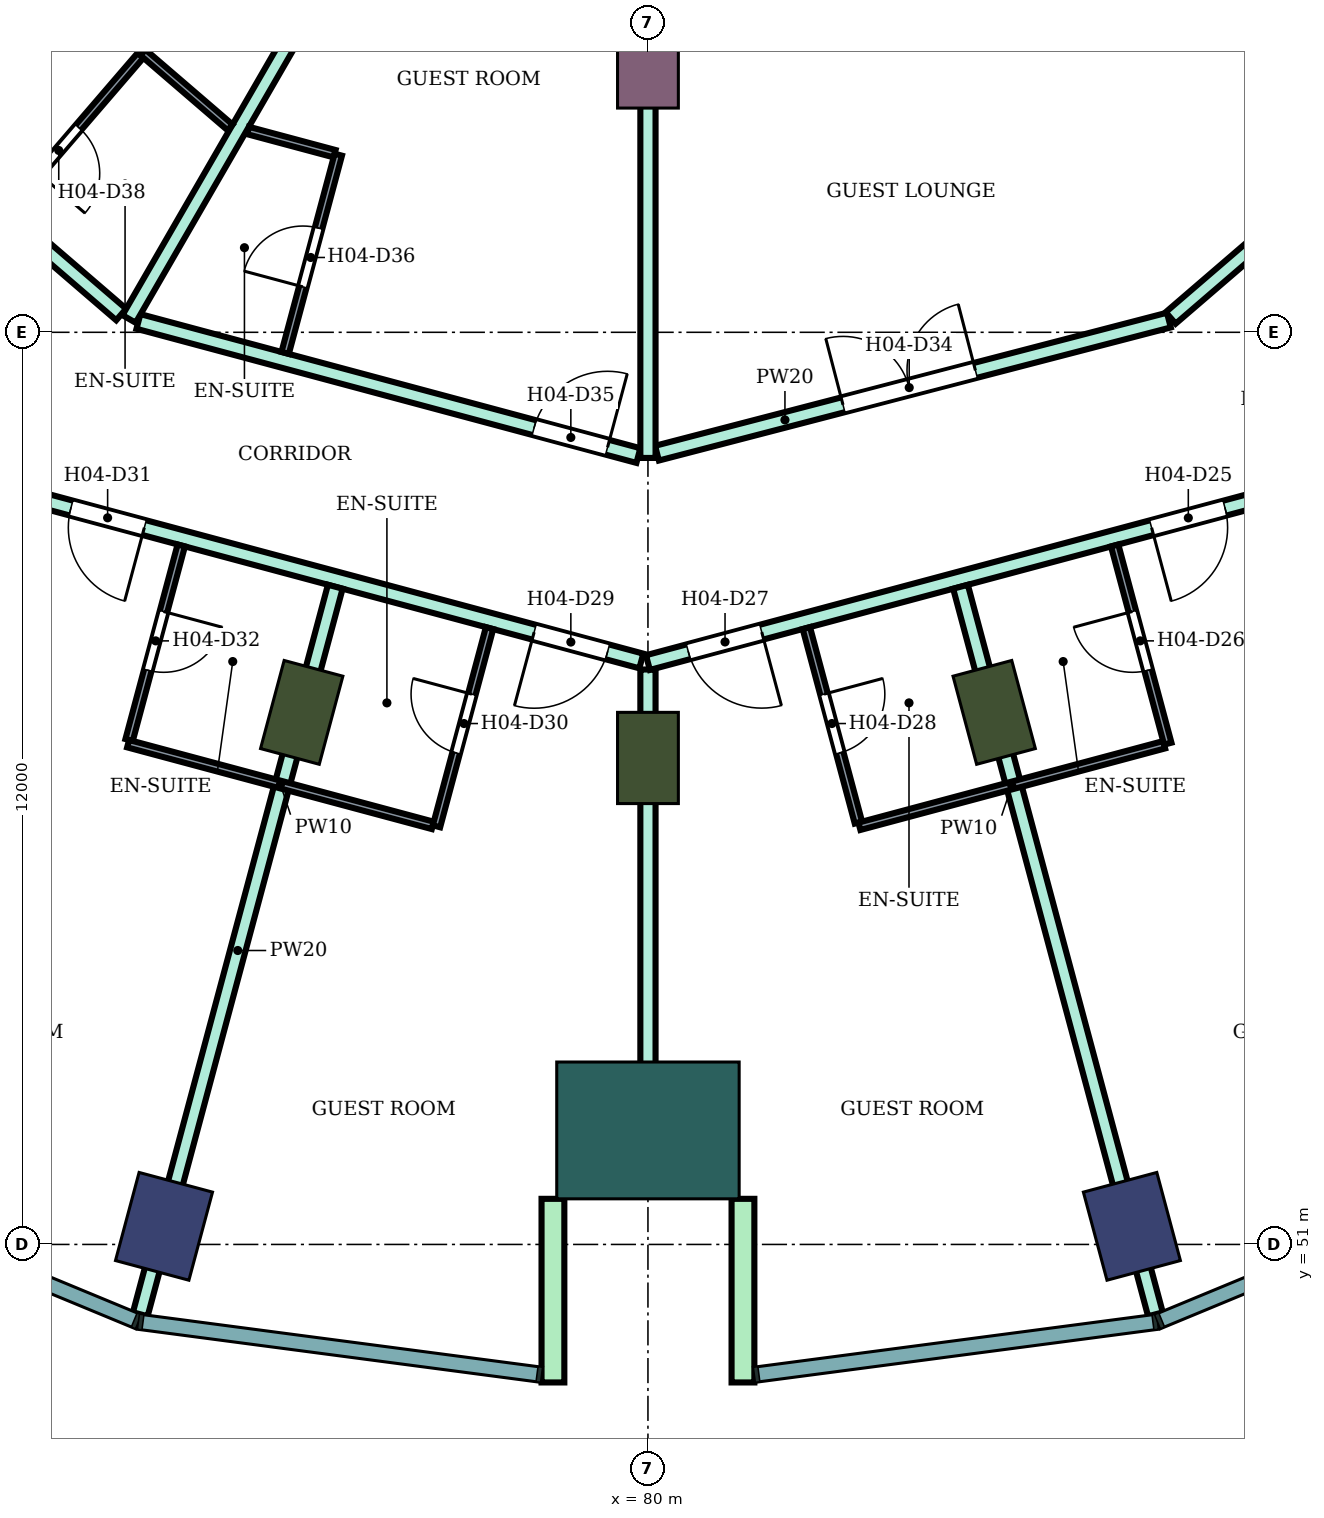
"""IFC4 building model, lengths in metres.
Left out: names, types, materials, properties, quantities, classifications, styles, units other than length and angle.
Written with IfcOpenShell. Run it as: python <this file> out.ifc"""

import sys

from ifc_helpers import new_model, si_unit, direction, frame, frame_2d, origin, origin_2d, place, context, subcontext, project, spatial, rectangle, extrude, element, fill, save


model = new_model("IFC4")
c1 = context("Model", 3, precision=1e-05, world=origin(), true_north=direction((0.0, 1.0)))
c2 = subcontext(c1, "Body", "Model", "MODEL_VIEW")
j1 = project(units=[si_unit("LENGTHUNIT", "METRE"), si_unit("PLANEANGLEUNIT", "RADIAN")], contexts=[c1])
p1 = place(None, origin())
s1 = spatial("IfcSite", under=j1, at=p1, CompositionType="ELEMENT")
p2 = place(p1, origin())
s2 = spatial("IfcBuilding", under=s1, at=p2, CompositionType="ELEMENT")
p3 = place(p2, frame((0.0, 0.0, 70.6)))
s3 = spatial("IfcBuildingStorey", under=s2, at=p3, CompositionType="ELEMENT", Elevation=70.6)
for number, where, z_axis, x_axis in (
    (1, (73.633, 51.238, 0.0), (0.0, 0.0, 1.0), (-0.259, -0.966, 0.0)),
    (2, (86.367, 51.238, 0.0), (0.0, 0.0, 1.0), (0.259, -0.966, 0.0)),
):
    element("IfcColumn", number, at=place(p3, frame(where, z_axis=z_axis, x_axis=x_axis)), inside=s3, PredefinedType="COLUMN", context=c2, shape_type="SweptSolid", body=[
        extrude(rectangle(XDim=1.2, YDim=1.0, at=origin_2d()), origin(), (0.0, 0.0, 1.0), 3.8),
    ])
for number, where, z_axis, x_axis in (
    (3, (75.445, 58.0, 0.0), (0.0, 0.0, 1.0), (-0.259, -0.966, 0.0)),
    (4, (80.0, 57.4, 0.0), (0.0, 0.0, 1.0), (0.0, -1.0, 0.0)),
    (5, (84.555, 58.0, 0.0), (0.0, 0.0, 1.0), (0.259, -0.966, 0.0)),
):
    element("IfcColumn", number, at=place(p3, frame(where, z_axis=z_axis, x_axis=x_axis)), inside=s3, PredefinedType="COLUMN", context=c2, shape_type="SweptSolid", body=[
        extrude(rectangle(XDim=1.2, YDim=0.8, at=origin_2d()), origin(), (0.0, 0.0, 1.0), 3.8),
    ])
p4 = place(p3, frame((80.0, 66.4, 0.0), z_axis=(0.0, 0.0, 1.0), x_axis=(0.0, -1.0, 0.0)))
e6 = element("IfcColumn", 6, at=p4, inside=s3, PredefinedType="COLUMN", context=c2, shape_type="SweptSolid", body=[
    extrude(rectangle(XDim=0.9, YDim=0.8, at=origin_2d()), origin(), (0.0, 0.0, 1.0), 3.8),
])
p5 = place(p3, frame((80.0, 52.5, 0.0), z_axis=(0.0, 0.0, 1.0), x_axis=(0.0, -1.0, 0.0)))
e7 = element("IfcColumn", 7, at=p5, inside=s3, PredefinedType="COLUMN", context=c2, shape_type="SweptSolid", body=[
    extrude(rectangle(XDim=1.8, YDim=2.4, at=origin_2d()), origin(), (0.0, 0.0, 1.0), 3.8),
])
for number, where, z_axis, x_axis in (
    (8, (78.75, 51.6, 0.0), (0.0, 0.0, 1.0), (0.0, -1.0, 0.0)),
    (9, (81.25, 51.6, 0.0), (0.0, 0.0, 1.0), (0.0, -1.0, 0.0)),
):
    element("IfcWall", number, at=place(p3, frame(where, z_axis=z_axis, x_axis=x_axis)), inside=s3, PredefinedType="NOTDEFINED", context=c2, shape_type="SweptSolid", body=[
        extrude(rectangle(XDim=2.416, YDim=0.3, at=frame_2d((1.208, 0.0))), origin(), (0.0, 0.0, 1.0), 3.8),
    ])
p6 = place(p3, frame((69.158, 66.6, 0.0), z_axis=(0.0, 0.0, 1.0), x_axis=(0.757976058094, -0.652282373943, 0.0)))
e10 = element("IfcWall", 10, at=p6, inside=s3, PredefinedType="PARTITIONING", context=c2, shape_type="SweptSolid", body=[
    extrude(rectangle(XDim=5.16, YDim=0.2, at=frame_2d((2.58, 0.0))), origin(), (0.0, 0.0, 1.0), 3.35),
])
p7 = place(p6, frame((1.6, 0.0, 0.0)))
e11 = element("IfcOpeningElement", 11, at=p7, cuts=e10, PredefinedType="OPENING", context=c2, shape_type="SweptSolid", body=[
    extrude(rectangle(XDim=1.0, YDim=2.1, at=frame_2d((0.5, 1.05))), frame((0.0, 0.11, 0.0), z_axis=(0.0, -1.0, 0.0), x_axis=(1.0, 0.0, 0.0)), (0.0, 0.0, 1.0), 0.22),
])
p8 = place(p3, frame((71.877, 60.832, 0.0), z_axis=(0.0, 0.0, 1.0), x_axis=(0.965852509869, -0.259092510851, 0.0)))
e12 = element("IfcWall", 12, at=p8, inside=s3, PredefinedType="PARTITIONING", context=c2, shape_type="SweptSolid", body=[
    extrude(rectangle(XDim=8.32, YDim=0.2, at=frame_2d((4.16, 0.0))), origin(), (0.0, 0.0, 1.0), 3.35),
])
p9 = place(p8, frame((6.86, 0.0, 0.0)))
e13 = element("IfcOpeningElement", 13, at=p9, cuts=e12, PredefinedType="OPENING", context=c2, shape_type="SweptSolid", body=[
    extrude(rectangle(XDim=1.0, YDim=2.1, at=frame_2d((0.5, 1.05))), frame((0.0, 0.11, 0.0), z_axis=(0.0, -1.0, 0.0), x_axis=(1.0, 0.0, 0.0)), (0.0, 0.0, 1.0), 0.22),
])
p10 = place(p8, frame((0.55, 0.0, 0.0)))
e14 = element("IfcOpeningElement", 14, at=p10, cuts=e12, PredefinedType="OPENING", context=c2, shape_type="SweptSolid", body=[
    extrude(rectangle(XDim=1.0, YDim=2.1, at=frame_2d((0.5, 1.05))), frame((0.0, 0.11, 0.0), z_axis=(0.0, -1.0, 0.0), x_axis=(1.0, 0.0, 0.0)), (0.0, 0.0, 1.0), 0.22),
])
p11 = place(p3, frame((73.297, 63.143, 0.0), z_axis=(0.0, 0.0, 1.0), x_axis=(0.965859030528, -0.25906820173, 0.0)))
e15 = element("IfcWall", 15, at=p11, inside=s3, PredefinedType="PARTITIONING", context=c2, shape_type="SweptSolid", body=[
    extrude(rectangle(XDim=6.81, YDim=0.2, at=frame_2d((3.405, 0.0))), origin(), (0.0, 0.0, 1.0), 3.35),
])
p12 = place(p11, frame((5.39, 0.0, 0.0)))
e16 = element("IfcOpeningElement", 16, at=p12, cuts=e15, PredefinedType="OPENING", context=c2, shape_type="SweptSolid", body=[
    extrude(rectangle(XDim=1.0, YDim=2.1, at=frame_2d((0.5, 1.05))), frame((0.0, 0.11, 0.0), z_axis=(0.0, -1.0, 0.0), x_axis=(1.0, 0.0, 0.0)), (0.0, 0.0, 1.0), 0.22),
])
p13 = place(p3, frame((73.174, 63.176, 0.0), z_axis=(0.0, 0.0, 1.0), x_axis=(0.500257106344, 0.865876912472, 0.0)))
e17 = element("IfcWall", 17, at=p13, inside=s3, PredefinedType="PARTITIONING", context=c2, shape_type="SweptSolid", body=[
    extrude(rectangle(XDim=5.955, YDim=0.2, at=frame_2d((2.978, 0.0))), origin(), (0.0, 0.0, 1.0), 3.35),
])
p14 = place(p3, frame((73.321, 50.081, 0.0), z_axis=(0.0, 0.0, 1.0), x_axis=(0.258889198551, 0.965907025999, 0.0)))
e18 = element("IfcWall", 18, at=p14, inside=s3, PredefinedType="PARTITIONING", context=c2, shape_type="SweptSolid", body=[
    extrude(rectangle(XDim=9.909, YDim=0.2, at=frame_2d((4.955, 0.0))), origin(), (0.0, 0.0, 1.0), 3.35),
])
p15 = place(p3, frame((80.119, 61.41, 0.0), z_axis=(0.0, 0.0, 1.0), x_axis=(0.967823361235, 0.251630565408, 0.0)))
e19 = element("IfcWall", 19, at=p15, inside=s3, PredefinedType="PARTITIONING", context=c2, shape_type="SweptSolid", body=[
    extrude(rectangle(XDim=6.958, YDim=0.2, at=frame_2d((3.479, 0.0))), origin(), (0.0, 0.0, 1.0), 3.35),
])
p16 = place(p15, frame((2.529, 0.0, 0.0)))
e20 = element("IfcOpeningElement", 20, at=p16, cuts=e19, PredefinedType="OPENING", context=c2, shape_type="SweptSolid", body=[
    extrude(rectangle(XDim=1.8, YDim=2.1, at=frame_2d((0.9, 1.05))), frame((0.0, 0.11, 0.0), z_axis=(0.0, -1.0, 0.0), x_axis=(1.0, 0.0, 0.0)), (0.0, 0.0, 1.0), 0.22),
])
p17 = place(p3, frame((80.0, 51.8, 0.0), z_axis=(0.0, 0.0, 1.0), x_axis=(0.0, 1.0, 0.0)))
e21 = element("IfcWall", 21, at=p17, inside=s3, PredefinedType="PARTITIONING", context=c2, shape_type="SweptSolid", body=[
    extrude(rectangle(XDim=6.764, YDim=0.2, at=frame_2d((3.382, 0.0))), origin(), (0.0, 0.0, 1.0), 3.35),
])
p18 = place(p3, frame((80.0, 58.655, 0.0), z_axis=(0.0, 0.0, 1.0), x_axis=(0.965974635626, 0.258636817424, 0.0)))
e22 = element("IfcWall", 22, at=p18, inside=s3, PredefinedType="PARTITIONING", context=c2, shape_type="SweptSolid", body=[
    extrude(rectangle(XDim=8.36, YDim=0.2, at=frame_2d((4.18, 0.0))), origin(), (0.0, 0.0, 1.0), 3.35),
])
p19 = place(p18, frame((6.86, 0.0, 0.0)))
e23 = element("IfcOpeningElement", 23, at=p19, cuts=e22, PredefinedType="OPENING", context=c2, shape_type="SweptSolid", body=[
    extrude(rectangle(XDim=1.0, YDim=2.1, at=frame_2d((0.5, 1.05))), frame((0.0, 0.11, 0.0), z_axis=(0.0, -1.0, 0.0), x_axis=(1.0, 0.0, 0.0)), (0.0, 0.0, 1.0), 0.22),
])
p20 = place(p18, frame((0.55, 0.0, 0.0)))
e24 = element("IfcOpeningElement", 24, at=p20, cuts=e22, PredefinedType="OPENING", context=c2, shape_type="SweptSolid", body=[
    extrude(rectangle(XDim=1.0, YDim=2.1, at=frame_2d((0.5, 1.05))), frame((0.0, 0.11, 0.0), z_axis=(0.0, -1.0, 0.0), x_axis=(1.0, 0.0, 0.0)), (0.0, 0.0, 1.0), 0.22),
])
p21 = place(p3, frame((80.0, 61.347, 0.0), z_axis=(0.0, 0.0, 1.0), x_axis=(0.0, 1.0, 0.0)))
e25 = element("IfcWall", 25, at=p21, inside=s3, PredefinedType="PARTITIONING", context=c2, shape_type="SweptSolid", body=[
    extrude(rectangle(XDim=5.953, YDim=0.2, at=frame_2d((2.977, 0.0))), origin(), (0.0, 0.0, 1.0), 3.35),
])
p22 = place(p3, frame((84.112, 59.652, 0.0), z_axis=(0.0, 0.0, 1.0), x_axis=(0.258791091927, -0.965933315886, 0.0)))
e26 = element("IfcWall", 26, at=p22, inside=s3, PredefinedType="PARTITIONING", context=c2, shape_type="SweptSolid", body=[
    extrude(rectangle(XDim=9.909, YDim=0.2, at=frame_2d((4.955, 0.0))), origin(), (0.0, 0.0, 1.0), 3.35),
])
p23 = place(p3, frame((86.877, 63.189, 0.0), z_axis=(0.0, 0.0, 1.0), x_axis=(0.758088707506, 0.652151448325, 0.0)))
e27 = element("IfcWall", 27, at=p23, inside=s3, PredefinedType="PARTITIONING", context=c2, shape_type="SweptSolid", body=[
    extrude(rectangle(XDim=5.229, YDim=0.2, at=frame_2d((2.615, 0.0))), origin(), (0.0, 0.0, 1.0), 3.35),
])
p24 = place(p3, frame((71.596, 64.635, 0.0), z_axis=(0.0, 0.0, 1.0), x_axis=(0.652285007511, 0.757973791748, 0.0)))
e28 = element("IfcWall", 28, at=p24, inside=s3, PredefinedType="PARTITIONING", context=c2, shape_type="SweptSolid", body=[
    extrude(rectangle(XDim=2.65, YDim=0.1, at=frame_2d((1.325, 0.0))), origin(), (0.0, 0.0, 1.0), 3.35),
])
p25 = place(p24, frame((0.6, 0.0, 0.0)))
e29 = element("IfcOpeningElement", 29, at=p25, cuts=e28, PredefinedType="OPENING", context=c2, shape_type="SweptSolid", body=[
    extrude(rectangle(XDim=0.8, YDim=2.1, at=frame_2d((0.4, 1.05))), frame((0.0, 0.06, 0.0), z_axis=(0.0, -1.0, 0.0), x_axis=(1.0, 0.0, 0.0)), (0.0, 0.0, 1.0), 0.12),
])
p26 = place(p3, frame((73.174, 57.636, 0.0), z_axis=(0.0, 0.0, 1.0), x_axis=(0.258952498977, 0.96589005755, 0.0)))
e30 = element("IfcWall", 30, at=p26, inside=s3, PredefinedType="PARTITIONING", context=c2, shape_type="SweptSolid", body=[
    extrude(rectangle(XDim=2.65, YDim=0.1, at=frame_2d((1.325, 0.0))), origin(), (0.0, 0.0, 1.0), 3.35),
])
p27 = place(p26, frame((0.95, 0.0, 0.0)))
e31 = element("IfcOpeningElement", 31, at=p27, cuts=e30, PredefinedType="OPENING", context=c2, shape_type="SweptSolid", body=[
    extrude(rectangle(XDim=0.8, YDim=2.1, at=frame_2d((0.4, 1.05))), frame((0.0, 0.06, 0.0), z_axis=(0.0, -1.0, 0.0), x_axis=(1.0, 0.0, 0.0)), (0.0, 0.0, 1.0), 0.12),
])
p28 = place(p3, frame((73.161, 57.588, 0.0), z_axis=(0.0, 0.0, 1.0), x_axis=(0.965858994467, -0.259068336173, 0.0)))
e32 = element("IfcWall", 32, at=p28, inside=s3, PredefinedType="PARTITIONING", context=c2, shape_type="SweptSolid", body=[
    extrude(rectangle(XDim=4.15, YDim=0.1, at=frame_2d((2.075, 0.0))), origin(), (0.0, 0.0, 1.0), 3.35),
])
p29 = place(p3, frame((73.357, 66.681, 0.0), z_axis=(0.0, 0.0, 1.0), x_axis=(0.758263469747, -0.651948242154, 0.0)))
e33 = element("IfcWall", 33, at=p29, inside=s3, PredefinedType="PARTITIONING", context=c2, shape_type="SweptSolid", body=[
    extrude(rectangle(XDim=1.511, YDim=0.1, at=frame_2d((0.755, 0.0))), origin(), (0.0, 0.0, 1.0), 3.35),
])
p30 = place(p3, frame((74.739, 65.655, 0.0), z_axis=(0.0, 0.0, 1.0), x_axis=(0.96591107063, -0.258874107695, 0.0)))
e34 = element("IfcWall", 34, at=p30, inside=s3, PredefinedType="PARTITIONING", context=c2, shape_type="SweptSolid", body=[
    extrude(rectangle(XDim=1.179, YDim=0.1, at=frame_2d((0.589, 0.0))), origin(), (0.0, 0.0, 1.0), 3.35),
])
p31 = place(p3, frame((75.227, 62.729, 0.0), z_axis=(0.0, 0.0, 1.0), x_axis=(0.258945475746, 0.965891940432, 0.0)))
e35 = element("IfcWall", 35, at=p31, inside=s3, PredefinedType="PARTITIONING", context=c2, shape_type="SweptSolid", body=[
    extrude(rectangle(XDim=2.7, YDim=0.1, at=frame_2d((1.35, 0.0))), origin(), (0.0, 0.0, 1.0), 3.35),
])
p32 = place(p31, frame((0.9, 0.0, 0.0)))
e36 = element("IfcOpeningElement", 36, at=p32, cuts=e35, PredefinedType="OPENING", context=c2, shape_type="SweptSolid", body=[
    extrude(rectangle(XDim=0.8, YDim=2.1, at=frame_2d((0.4, 1.05))), frame((0.0, 0.06, 0.0), z_axis=(0.0, -1.0, 0.0), x_axis=(1.0, 0.0, 0.0)), (0.0, 0.0, 1.0), 0.12),
])
p33 = place(p3, frame((77.218, 56.501, 0.0), z_axis=(0.0, 0.0, 1.0), x_axis=(0.258591408257, 0.965986792651, 0.0)))
e37 = element("IfcWall", 37, at=p33, inside=s3, PredefinedType="PARTITIONING", context=c2, shape_type="SweptSolid", body=[
    extrude(rectangle(XDim=2.699, YDim=0.1, at=frame_2d((1.35, 0.0))), origin(), (0.0, 0.0, 1.0), 3.35),
])
p34 = place(p33, frame((1.0, 0.0, 0.0)))
e38 = element("IfcOpeningElement", 38, at=p34, cuts=e37, PredefinedType="OPENING", context=c2, shape_type="SweptSolid", body=[
    extrude(rectangle(XDim=0.8, YDim=2.1, at=frame_2d((0.4, 1.05))), frame((0.0, 0.06, 0.0), z_axis=(0.0, -1.0, 0.0), x_axis=(1.0, 0.0, 0.0)), (0.0, 0.0, 1.0), 0.12),
])
p35 = place(p3, frame((82.084, 59.108, 0.0), z_axis=(0.0, 0.0, 1.0), x_axis=(0.258591746437, -0.965986702121, 0.0)))
e39 = element("IfcWall", 39, at=p35, inside=s3, PredefinedType="PARTITIONING", context=c2, shape_type="SweptSolid", body=[
    extrude(rectangle(XDim=2.649, YDim=0.1, at=frame_2d((1.325, 0.0))), origin(), (0.0, 0.0, 1.0), 3.35),
])
p36 = place(p35, frame((0.9, 0.0, 0.0)))
e40 = element("IfcOpeningElement", 40, at=p36, cuts=e39, PredefinedType="OPENING", context=c2, shape_type="SweptSolid", body=[
    extrude(rectangle(XDim=0.8, YDim=2.1, at=frame_2d((0.4, 1.05))), frame((0.0, 0.06, 0.0), z_axis=(0.0, -1.0, 0.0), x_axis=(1.0, 0.0, 0.0)), (0.0, 0.0, 1.0), 0.12),
])
p37 = place(p3, frame((82.782, 56.501, 0.0), z_axis=(0.0, 0.0, 1.0), x_axis=(0.965999228418, 0.258544949083, 0.0)))
e41 = element("IfcWall", 41, at=p37, inside=s3, PredefinedType="PARTITIONING", context=c2, shape_type="SweptSolid", body=[
    extrude(rectangle(XDim=4.15, YDim=0.1, at=frame_2d((2.075, 0.0))), origin(), (0.0, 0.0, 1.0), 3.35),
])
p38 = place(p3, frame((86.14, 60.196, 0.0), z_axis=(0.0, 0.0, 1.0), x_axis=(0.258945475746, -0.965891940432, 0.0)))
e42 = element("IfcWall", 42, at=p38, inside=s3, PredefinedType="PARTITIONING", context=c2, shape_type="SweptSolid", body=[
    extrude(rectangle(XDim=2.7, YDim=0.1, at=frame_2d((1.35, 0.0))), origin(), (0.0, 0.0, 1.0), 3.35),
])
p39 = place(p38, frame((0.9, 0.0, 0.0)))
e43 = element("IfcOpeningElement", 43, at=p39, cuts=e42, PredefinedType="OPENING", context=c2, shape_type="SweptSolid", body=[
    extrude(rectangle(XDim=0.8, YDim=2.1, at=frame_2d((0.4, 1.05))), frame((0.0, 0.06, 0.0), z_axis=(0.0, -1.0, 0.0), x_axis=(1.0, 0.0, 0.0)), (0.0, 0.0, 1.0), 0.12),
])
p40 = place(p19, frame((1.0, 0.0, 0.0), z_axis=(0.0, 0.0, 1.0), x_axis=(-1.0, 0.0, 0.0)))
e44 = element("IfcDoor", 44, at=p40, inside=s3, OperationType="SINGLE_SWING_RIGHT", PredefinedType="DOOR", context=c2, shape_type="SweptSolid", body=[
    extrude(rectangle(XDim=1.0, YDim=2.1, at=frame_2d((0.5, 1.05))), frame((0.0, 0.025, 0.0), z_axis=(0.0, -1.0, 0.0), x_axis=(1.0, 0.0, 0.0)), (0.0, 0.0, 1.0), 0.05),
])
fill(e23, e44)
p41 = place(p39, frame((0.8, 0.0, 0.0), z_axis=(0.0, 0.0, 1.0), x_axis=(-1.0, 0.0, 0.0)))
e45 = element("IfcDoor", 45, at=p41, inside=s3, OperationType="SINGLE_SWING_RIGHT", PredefinedType="DOOR", context=c2, shape_type="SweptSolid", body=[
    extrude(rectangle(XDim=0.8, YDim=2.1, at=frame_2d((0.4, 1.05))), frame((0.0, 0.025, 0.0), z_axis=(0.0, -1.0, 0.0), x_axis=(1.0, 0.0, 0.0)), (0.0, 0.0, 1.0), 0.05),
])
fill(e43, e45)
p42 = place(p20, frame((1.0, 0.0, 0.0), z_axis=(0.0, 0.0, 1.0), x_axis=(-1.0, 0.0, 0.0)))
e46 = element("IfcDoor", 46, at=p42, inside=s3, OperationType="SINGLE_SWING_LEFT", PredefinedType="DOOR", context=c2, shape_type="SweptSolid", body=[
    extrude(rectangle(XDim=1.0, YDim=2.1, at=frame_2d((0.5, 1.05))), frame((0.0, 0.025, 0.0), z_axis=(0.0, -1.0, 0.0), x_axis=(1.0, 0.0, 0.0)), (0.0, 0.0, 1.0), 0.05),
])
fill(e24, e46)
p43 = place(p36, origin())
e47 = element("IfcDoor", 47, at=p43, inside=s3, OperationType="SINGLE_SWING_LEFT", PredefinedType="DOOR", context=c2, shape_type="SweptSolid", body=[
    extrude(rectangle(XDim=0.8, YDim=2.1, at=frame_2d((0.4, 1.05))), frame((0.0, 0.025, 0.0), z_axis=(0.0, -1.0, 0.0), x_axis=(1.0, 0.0, 0.0)), (0.0, 0.0, 1.0), 0.05),
])
fill(e40, e47)
p44 = place(p9, frame((1.0, 0.0, 0.0), z_axis=(0.0, 0.0, 1.0), x_axis=(-1.0, 0.0, 0.0)))
e48 = element("IfcDoor", 48, at=p44, inside=s3, OperationType="SINGLE_SWING_RIGHT", PredefinedType="DOOR", context=c2, shape_type="SweptSolid", body=[
    extrude(rectangle(XDim=1.0, YDim=2.1, at=frame_2d((0.5, 1.05))), frame((0.0, 0.025, 0.0), z_axis=(0.0, -1.0, 0.0), x_axis=(1.0, 0.0, 0.0)), (0.0, 0.0, 1.0), 0.05),
])
fill(e13, e48)
p45 = place(p34, origin())
e49 = element("IfcDoor", 49, at=p45, inside=s3, OperationType="SINGLE_SWING_RIGHT", PredefinedType="DOOR", context=c2, shape_type="SweptSolid", body=[
    extrude(rectangle(XDim=0.8, YDim=2.1, at=frame_2d((0.4, 1.05))), frame((0.0, 0.025, 0.0), z_axis=(0.0, -1.0, 0.0), x_axis=(1.0, 0.0, 0.0)), (0.0, 0.0, 1.0), 0.05),
])
fill(e38, e49)
p46 = place(p10, frame((1.0, 0.0, 0.0), z_axis=(0.0, 0.0, 1.0), x_axis=(-1.0, 0.0, 0.0)))
e50 = element("IfcDoor", 50, at=p46, inside=s3, OperationType="SINGLE_SWING_LEFT", PredefinedType="DOOR", context=c2, shape_type="SweptSolid", body=[
    extrude(rectangle(XDim=1.0, YDim=2.1, at=frame_2d((0.5, 1.05))), frame((0.0, 0.025, 0.0), z_axis=(0.0, -1.0, 0.0), x_axis=(1.0, 0.0, 0.0)), (0.0, 0.0, 1.0), 0.05),
])
fill(e14, e50)
p47 = place(p27, frame((0.8, 0.0, 0.0), z_axis=(0.0, 0.0, 1.0), x_axis=(-1.0, 0.0, 0.0)))
e51 = element("IfcDoor", 51, at=p47, inside=s3, OperationType="SINGLE_SWING_LEFT", PredefinedType="DOOR", context=c2, shape_type="SweptSolid", body=[
    extrude(rectangle(XDim=0.8, YDim=2.1, at=frame_2d((0.4, 1.05))), frame((0.0, 0.025, 0.0), z_axis=(0.0, -1.0, 0.0), x_axis=(1.0, 0.0, 0.0)), (0.0, 0.0, 1.0), 0.05),
])
fill(e31, e51)
p48 = place(p16, origin())
e52 = element("IfcDoor", 52, at=p48, inside=s3, OperationType="DOUBLE_DOOR_SINGLE_SWING", PredefinedType="DOOR", context=c2, shape_type="SweptSolid", body=[
    extrude(rectangle(XDim=1.8, YDim=2.1, at=frame_2d((0.9, 1.05))), frame((0.0, 0.025, 0.0), z_axis=(0.0, -1.0, 0.0), x_axis=(1.0, 0.0, 0.0)), (0.0, 0.0, 1.0), 0.05),
])
fill(e20, e52)
p49 = place(p12, origin())
e53 = element("IfcDoor", 53, at=p49, inside=s3, OperationType="SINGLE_SWING_RIGHT", PredefinedType="DOOR", context=c2, shape_type="SweptSolid", body=[
    extrude(rectangle(XDim=1.0, YDim=2.1, at=frame_2d((0.5, 1.05))), frame((0.0, 0.025, 0.0), z_axis=(0.0, -1.0, 0.0), x_axis=(1.0, 0.0, 0.0)), (0.0, 0.0, 1.0), 0.05),
])
fill(e16, e53)
p50 = place(p32, origin())
e54 = element("IfcDoor", 54, at=p50, inside=s3, OperationType="SINGLE_SWING_LEFT", PredefinedType="DOOR", context=c2, shape_type="SweptSolid", body=[
    extrude(rectangle(XDim=0.8, YDim=2.1, at=frame_2d((0.4, 1.05))), frame((0.0, 0.025, 0.0), z_axis=(0.0, -1.0, 0.0), x_axis=(1.0, 0.0, 0.0)), (0.0, 0.0, 1.0), 0.05),
])
fill(e36, e54)
p51 = place(p25, frame((0.8, 0.0, 0.0), z_axis=(0.0, 0.0, 1.0), x_axis=(-1.0, 0.0, 0.0)))
e55 = element("IfcDoor", 55, at=p51, inside=s3, OperationType="SINGLE_SWING_RIGHT", PredefinedType="DOOR", context=c2, shape_type="SweptSolid", body=[
    extrude(rectangle(XDim=0.8, YDim=2.1, at=frame_2d((0.4, 1.05))), frame((0.0, 0.025, 0.0), z_axis=(0.0, -1.0, 0.0), x_axis=(1.0, 0.0, 0.0)), (0.0, 0.0, 1.0), 0.05),
])
fill(e29, e55)
save(model, sys.argv[1])
